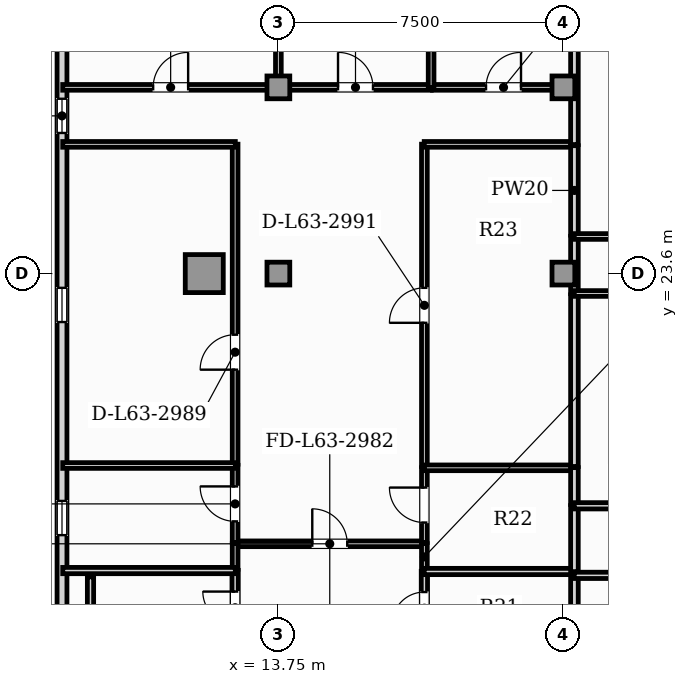
"""IFC4 building model, lengths in metres.
Left out: names, types, materials, properties, quantities, classifications, styles, units other than length and angle.
Written with IfcOpenShell. Run it as: python <this file> out.ifc"""

import sys

from ifc_helpers import new_model, si_unit, direction, frame, frame_2d, origin, origin_2d, place, context, subcontext, project, spatial, rectangle, hollow_rectangle, extrude, element, fill, save


model = new_model("IFC4")
c1 = context("Model", 3, precision=1e-05, world=origin(), true_north=direction((0.0, 1.0)))
c2 = subcontext(c1, "Body", "Model", "MODEL_VIEW")
j1 = project(units=[si_unit("LENGTHUNIT", "METRE"), si_unit("PLANEANGLEUNIT", "RADIAN")], contexts=[c1])
p1 = place(None, origin())
s1 = spatial("IfcSite", under=j1, at=p1, CompositionType="ELEMENT")
p2 = place(p1, origin())
s2 = spatial("IfcBuilding", under=s1, at=p2, CompositionType="ELEMENT")
p3 = place(p2, frame((0.0, 0.0, 256.75)))
s3 = spatial("IfcBuildingStorey", under=s2, at=p3, CompositionType="ELEMENT", Elevation=256.75)
p4 = place(p3, frame((11.8, 23.6, 0.0), z_axis=(0.0, 0.0, 1.0), x_axis=(1.0, 0.0, 0.0)))
e1 = element("IfcColumn", 1, at=p4, inside=s3, PredefinedType="USERDEFINED", context=c2, shape_type="SweptSolid", body=[
    extrude(hollow_rectangle(XDim=1.0, YDim=1.0, WallThickness=0.06, at=origin_2d()), origin(), (0.0, 0.0, 1.0), 3.85),
])
for number, where, z_axis, x_axis in (
    (2, (13.75, 23.6, 0.0), (0.0, 0.0, 1.0), (1.0, 0.0, 0.0)),
    (3, (21.25, 23.6, 0.0), (0.0, 0.0, 1.0), (1.0, 0.0, 0.0)),
    (4, (13.75, 28.5, 0.0), (0.0, 0.0, 1.0), (1.0, 0.0, 0.0)),
    (5, (21.25, 28.5, 0.0), (0.0, 0.0, 1.0), (1.0, 0.0, 0.0)),
):
    element("IfcColumn", number, at=place(p3, frame(where, z_axis=z_axis, x_axis=x_axis)), inside=s3, PredefinedType="COLUMN", context=c2, shape_type="SweptSolid", body=[
        extrude(rectangle(XDim=0.6, YDim=0.6, at=origin_2d()), origin(), (0.0, 0.0, 1.0), 3.85),
    ])
p5 = place(p3, frame((8.057, 32.726, 0.0), z_axis=(0.0, 0.0, 1.0), x_axis=(0.0, -1.0, 0.0)))
e6 = element("IfcWall", 6, at=p5, inside=s3, PredefinedType="SOLIDWALL", context=c2, shape_type="SweptSolid", body=[
    extrude(rectangle(XDim=29.486, YDim=0.26, at=frame_2d((14.743, 0.0))), origin(), (0.0, 0.0, 1.0), 3.19),
])
p6 = place(p5, frame((24.186, 0.0, 0.85)))
e7 = element("IfcOpeningElement", 7, at=p6, cuts=e6, PredefinedType="OPENING", context=c2, shape_type="SweptSolid", body=[
    extrude(rectangle(XDim=0.9, YDim=1.4, at=frame_2d((0.45, 0.7))), frame((0.0, 0.14, 0.0), z_axis=(0.0, -1.0, 0.0), x_axis=(1.0, 0.0, 0.0)), (0.0, 0.0, 1.0), 0.28),
])
p7 = place(p5, frame((4.526, 0.0, 0.85)))
e8 = element("IfcOpeningElement", 8, at=p7, cuts=e6, PredefinedType="OPENING", context=c2, shape_type="SweptSolid", body=[
    extrude(rectangle(XDim=0.9, YDim=1.4, at=frame_2d((0.45, 0.7))), frame((0.0, 0.14, 0.0), z_axis=(0.0, -1.0, 0.0), x_axis=(1.0, 0.0, 0.0)), (0.0, 0.0, 1.0), 0.28),
])
p8 = place(p5, frame((15.108, 0.0, 0.85)))
e9 = element("IfcOpeningElement", 9, at=p8, cuts=e6, PredefinedType="OPENING", context=c2, shape_type="SweptSolid", body=[
    extrude(rectangle(XDim=0.9, YDim=1.4, at=frame_2d((0.45, 0.7))), frame((0.0, 0.14, 0.0), z_axis=(0.0, -1.0, 0.0), x_axis=(1.0, 0.0, 0.0)), (0.0, 0.0, 1.0), 0.28),
])
p9 = place(p5, frame((9.501, 0.0, 0.85)))
e10 = element("IfcOpeningElement", 10, at=p9, cuts=e6, PredefinedType="OPENING", context=c2, shape_type="SweptSolid", body=[
    extrude(rectangle(XDim=0.9, YDim=1.4, at=frame_2d((0.45, 0.7))), frame((0.0, 0.14, 0.0), z_axis=(0.0, -1.0, 0.0), x_axis=(1.0, 0.0, 0.0)), (0.0, 0.0, 1.0), 0.28),
])
p10 = place(p3, frame((12.607, 16.49, 0.0), z_axis=(0.0, 0.0, 1.0), x_axis=(1.0, 0.0, 0.0)))
e11 = element("IfcWall", 11, at=p10, inside=s3, PredefinedType="PARTITIONING", context=c2, shape_type="SweptSolid", body=[
    extrude(rectangle(XDim=4.99, YDim=0.15, at=frame_2d((2.495, 0.0))), origin(), (0.0, 0.0, 1.0), 3.65),
])
p11 = place(p10, frame((2.035, 0.0, 0.0)))
e12 = element("IfcOpeningElement", 12, at=p11, cuts=e11, PredefinedType="OPENING", context=c2, shape_type="SweptSolid", body=[
    extrude(rectangle(XDim=0.92, YDim=2.1, at=frame_2d((0.46, 1.05))), frame((0.0, 0.085, 0.0), z_axis=(0.0, -1.0, 0.0), x_axis=(1.0, 0.0, 0.0)), (0.0, 0.0, 1.0), 0.17),
])
p12 = place(p3, frame((12.612, 13.825, 0.0), z_axis=(0.0, 0.0, 1.0), x_axis=(0.0, 1.0, 0.0)))
e13 = element("IfcWall", 13, at=p12, inside=s3, PredefinedType="PLUMBINGWALL", context=c2, shape_type="SweptSolid", body=[
    extrude(rectangle(XDim=1.967, YDim=0.165, at=frame_2d((0.983, 0.0))), origin(), (0.0, 0.0, 1.0), 3.65),
])
p13 = place(p12, frame((0.558, 0.0, 0.0)))
e14 = element("IfcOpeningElement", 14, at=p13, cuts=e13, PredefinedType="OPENING", context=c2, shape_type="SweptSolid", body=[
    extrude(rectangle(XDim=0.85, YDim=2.1, at=frame_2d((0.425, 1.05))), frame((0.0, 0.093, 0.0), z_axis=(0.0, -1.0, 0.0), x_axis=(1.0, 0.0, 0.0)), (0.0, 0.0, 1.0), 0.185),
])
p14 = place(p3, frame((12.612, 15.821, 0.0), z_axis=(0.0, 0.0, 1.0), x_axis=(0.0, 1.0, 0.0)))
e15 = element("IfcWall", 15, at=p14, inside=s3, PredefinedType="PARTITIONING", context=c2, shape_type="SweptSolid", body=[
    extrude(rectangle(XDim=0.674, YDim=0.15, at=frame_2d((0.337, 0.0))), origin(), (0.0, 0.0, 1.0), 3.65),
])
p15 = place(p3, frame((17.592, 13.825, 0.0), z_axis=(0.0, 0.0, 1.0), x_axis=(0.0, 1.0, 0.0)))
e16 = element("IfcWall", 16, at=p15, inside=s3, PredefinedType="PLUMBINGWALL", context=c2, shape_type="SweptSolid", body=[
    extrude(rectangle(XDim=1.942, YDim=0.165, at=frame_2d((0.971, 0.0))), origin(), (0.0, 0.0, 1.0), 3.65),
])
p16 = place(p15, frame((0.546, 0.0, 0.0)))
e17 = element("IfcOpeningElement", 17, at=p16, cuts=e16, PredefinedType="OPENING", context=c2, shape_type="SweptSolid", body=[
    extrude(rectangle(XDim=0.85, YDim=2.1, at=frame_2d((0.425, 1.05))), frame((0.0, 0.093, 0.0), z_axis=(0.0, -1.0, 0.0), x_axis=(1.0, 0.0, 0.0)), (0.0, 0.0, 1.0), 0.185),
])
p17 = place(p3, frame((17.592, 15.797, 0.0), z_axis=(0.0, 0.0, 1.0), x_axis=(0.0, 1.0, 0.0)))
e18 = element("IfcWall", 18, at=p17, inside=s3, PredefinedType="PARTITIONING", context=c2, shape_type="SweptSolid", body=[
    extrude(rectangle(XDim=0.699, YDim=0.15, at=frame_2d((0.349, 0.0))), origin(), (0.0, 0.0, 1.0), 3.65),
])
p18 = place(p3, frame((12.612, 16.525, 0.0), z_axis=(0.0, 0.0, 1.0), x_axis=(0.0, 1.0, 0.0)))
e19 = element("IfcWall", 19, at=p18, inside=s3, PredefinedType="PARTITIONING", context=c2, shape_type="SweptSolid", body=[
    extrude(rectangle(XDim=2.03, YDim=0.15, at=frame_2d((1.015, 0.0))), origin(), (0.0, 0.0, 1.0), 3.65),
])
p19 = place(p18, frame((0.555, 0.0, 0.0)))
e20 = element("IfcOpeningElement", 20, at=p19, cuts=e19, PredefinedType="OPENING", context=c2, shape_type="SweptSolid", body=[
    extrude(rectangle(XDim=0.92, YDim=2.1, at=frame_2d((0.46, 1.05))), frame((0.0, 0.085, 0.0), z_axis=(0.0, -1.0, 0.0), x_axis=(1.0, 0.0, 0.0)), (0.0, 0.0, 1.0), 0.17),
])
p20 = place(p3, frame((12.612, 18.585, 0.0), z_axis=(0.0, 0.0, 1.0), x_axis=(0.0, 1.0, 0.0)))
e21 = element("IfcWall", 21, at=p20, inside=s3, PredefinedType="PARTITIONING", context=c2, shape_type="SweptSolid", body=[
    extrude(rectangle(XDim=8.42, YDim=0.15, at=frame_2d((4.21, 0.0))), origin(), (0.0, 0.0, 1.0), 3.65),
])
p21 = place(p20, frame((2.487, 0.0, 0.0)))
e22 = element("IfcOpeningElement", 22, at=p21, cuts=e21, PredefinedType="OPENING", context=c2, shape_type="SweptSolid", body=[
    extrude(rectangle(XDim=0.92, YDim=2.1, at=frame_2d((0.46, 1.05))), frame((0.0, 0.085, 0.0), z_axis=(0.0, -1.0, 0.0), x_axis=(1.0, 0.0, 0.0)), (0.0, 0.0, 1.0), 0.17),
])
p22 = place(p3, frame((8.076, 27.0, 0.0), z_axis=(0.0, 0.0, 1.0), x_axis=(1.0, 0.0, 0.0)))
e23 = element("IfcWall", 23, at=p22, inside=s3, PredefinedType="PARTITIONING", context=c2, shape_type="SweptSolid", body=[
    extrude(rectangle(XDim=4.541, YDim=0.15, at=frame_2d((2.271, 0.0))), origin(), (0.0, 0.0, 1.0), 3.65),
])
p23 = place(p3, frame((17.592, 16.525, 0.0), z_axis=(0.0, 0.0, 1.0), x_axis=(0.0, 1.0, 0.0)))
e24 = element("IfcWall", 24, at=p23, inside=s3, PredefinedType="PARTITIONING", context=c2, shape_type="SweptSolid", body=[
    extrude(rectangle(XDim=1.969, YDim=0.15, at=frame_2d((0.984, 0.0))), origin(), (0.0, 0.0, 1.0), 3.65),
])
p24 = place(p23, frame((0.524, 0.0, 0.0)))
e25 = element("IfcOpeningElement", 25, at=p24, cuts=e24, PredefinedType="OPENING", context=c2, shape_type="SweptSolid", body=[
    extrude(rectangle(XDim=0.92, YDim=2.1, at=frame_2d((0.46, 1.05))), frame((0.0, 0.085, 0.0), z_axis=(0.0, -1.0, 0.0), x_axis=(1.0, 0.0, 0.0)), (0.0, 0.0, 1.0), 0.17),
])
p25 = place(p3, frame((17.592, 18.524, 0.0), z_axis=(0.0, 0.0, 1.0), x_axis=(0.0, 1.0, 0.0)))
e26 = element("IfcWall", 26, at=p25, inside=s3, PredefinedType="PARTITIONING", context=c2, shape_type="SweptSolid", body=[
    extrude(rectangle(XDim=8.48, YDim=0.15, at=frame_2d((4.24, 0.0))), origin(), (0.0, 0.0, 1.0), 3.65),
])
p26 = place(p25, frame((3.78, 0.0, 0.0)))
e27 = element("IfcOpeningElement", 27, at=p26, cuts=e26, PredefinedType="OPENING", context=c2, shape_type="SweptSolid", body=[
    extrude(rectangle(XDim=0.92, YDim=2.1, at=frame_2d((0.46, 1.05))), frame((0.0, 0.085, 0.0), z_axis=(0.0, -1.0, 0.0), x_axis=(1.0, 0.0, 0.0)), (0.0, 0.0, 1.0), 0.17),
])
p27 = place(p3, frame((17.587, 27.0, 0.0), z_axis=(0.0, 0.0, 1.0), x_axis=(1.0, 0.0, 0.0)))
e28 = element("IfcWall", 28, at=p27, inside=s3, PredefinedType="PARTITIONING", context=c2, shape_type="SweptSolid", body=[
    extrude(rectangle(XDim=3.958, YDim=0.15, at=frame_2d((1.979, 0.0))), origin(), (0.0, 0.0, 1.0), 3.65),
])
p28 = place(p3, frame((8.076, 28.5, 0.0), z_axis=(0.0, 0.0, 1.0), x_axis=(1.0, 0.0, 0.0)))
e29 = element("IfcWall", 29, at=p28, inside=s3, PredefinedType="PARTITIONING", context=c2, shape_type="SweptSolid", body=[
    extrude(rectangle(XDim=5.679, YDim=0.15, at=frame_2d((2.839, 0.0))), origin(), (0.0, 0.0, 1.0), 3.65),
])
p29 = place(p28, frame((2.379, 0.0, 0.0)))
e30 = element("IfcOpeningElement", 30, at=p29, cuts=e29, PredefinedType="OPENING", context=c2, shape_type="SweptSolid", body=[
    extrude(rectangle(XDim=0.92, YDim=2.1, at=frame_2d((0.46, 1.05))), frame((0.0, 0.085, 0.0), z_axis=(0.0, -1.0, 0.0), x_axis=(1.0, 0.0, 0.0)), (0.0, 0.0, 1.0), 0.17),
])
p30 = place(p3, frame((13.785, 28.5, 0.0), z_axis=(0.0, 0.0, 1.0), x_axis=(1.0, 0.0, 0.0)))
e31 = element("IfcWall", 31, at=p30, inside=s3, PredefinedType="PARTITIONING", context=c2, shape_type="SweptSolid", body=[
    extrude(rectangle(XDim=3.989, YDim=0.15, at=frame_2d((1.994, 0.0))), origin(), (0.0, 0.0, 1.0), 3.105),
])
p31 = place(p30, frame((1.534, 0.0, 0.0)))
e32 = element("IfcOpeningElement", 32, at=p31, cuts=e31, PredefinedType="OPENING", context=c2, shape_type="SweptSolid", body=[
    extrude(rectangle(XDim=0.92, YDim=2.1, at=frame_2d((0.46, 1.05))), frame((0.0, 0.085, 0.0), z_axis=(0.0, -1.0, 0.0), x_axis=(1.0, 0.0, 0.0)), (0.0, 0.0, 1.0), 0.17),
])
p32 = place(p3, frame((17.804, 28.5, 0.0), z_axis=(0.0, 0.0, 1.0), x_axis=(1.0, 0.0, 0.0)))
e33 = element("IfcWall", 33, at=p32, inside=s3, PredefinedType="PARTITIONING", context=c2, shape_type="SweptSolid", body=[
    extrude(rectangle(XDim=3.741, YDim=0.15, at=frame_2d((1.871, 0.0))), origin(), (0.0, 0.0, 1.0), 3.105),
])
p33 = place(p32, frame((1.411, 0.0, 0.0)))
e34 = element("IfcOpeningElement", 34, at=p33, cuts=e33, PredefinedType="OPENING", context=c2, shape_type="SweptSolid", body=[
    extrude(rectangle(XDim=0.92, YDim=2.1, at=frame_2d((0.46, 1.05))), frame((0.0, 0.085, 0.0), z_axis=(0.0, -1.0, 0.0), x_axis=(1.0, 0.0, 0.0)), (0.0, 0.0, 1.0), 0.17),
])
p34 = place(p3, frame((21.54, 26.995, 0.0), z_axis=(0.0, 0.0, 1.0), x_axis=(0.0, 1.0, 0.0)))
e35 = element("IfcWall", 35, at=p34, inside=s3, PredefinedType="PARTITIONING", context=c2, shape_type="SweptSolid", body=[
    extrude(rectangle(XDim=2.622, YDim=0.2, at=frame_2d((1.311, 0.0))), origin(), (0.0, 0.0, 1.0), 3.65),
])
p35 = place(p3, frame((8.076, 15.786, 0.0), z_axis=(0.0, 0.0, 1.0), x_axis=(1.0, 0.0, 0.0)))
e36 = element("IfcWall", 36, at=p35, inside=s3, PredefinedType="PLUMBINGWALL", context=c2, shape_type="SweptSolid", body=[
    extrude(rectangle(XDim=4.541, YDim=0.165, at=frame_2d((2.271, 0.0))), origin(), (0.0, 0.0, 1.0), 3.65),
])
p36 = place(p3, frame((8.076, 18.55, 0.0), z_axis=(0.0, 0.0, 1.0), x_axis=(1.0, 0.0, 0.0)))
e37 = element("IfcWall", 37, at=p36, inside=s3, PredefinedType="PARTITIONING", context=c2, shape_type="SweptSolid", body=[
    extrude(rectangle(XDim=4.541, YDim=0.15, at=frame_2d((2.271, 0.0))), origin(), (0.0, 0.0, 1.0), 3.65),
])
p37 = place(p3, frame((17.587, 15.762, 0.0), z_axis=(0.0, 0.0, 1.0), x_axis=(1.0, 0.0, 0.0)))
e38 = element("IfcWall", 38, at=p37, inside=s3, PredefinedType="PLUMBINGWALL", context=c2, shape_type="SweptSolid", body=[
    extrude(rectangle(XDim=3.958, YDim=0.165, at=frame_2d((1.979, 0.0))), origin(), (0.0, 0.0, 1.0), 3.65),
])
p38 = place(p3, frame((21.54, 13.825, 0.0), z_axis=(0.0, 0.0, 1.0), x_axis=(0.0, 1.0, 0.0)))
e39 = element("IfcWall", 39, at=p38, inside=s3, PredefinedType="PARTITIONING", context=c2, shape_type="SweptSolid", body=[
    extrude(rectangle(XDim=1.84, YDim=0.2, at=frame_2d((0.92, 0.0))), origin(), (0.0, 0.0, 1.0), 3.65),
])
p39 = place(p3, frame((17.587, 18.49, 0.0), z_axis=(0.0, 0.0, 1.0), x_axis=(1.0, 0.0, 0.0)))
e40 = element("IfcWall", 40, at=p39, inside=s3, PredefinedType="PARTITIONING", context=c2, shape_type="SweptSolid", body=[
    extrude(rectangle(XDim=3.958, YDim=0.15, at=frame_2d((1.979, 0.0))), origin(), (0.0, 0.0, 1.0), 3.65),
])
p40 = place(p3, frame((21.54, 15.757, 0.0), z_axis=(0.0, 0.0, 1.0), x_axis=(0.0, 1.0, 0.0)))
e41 = element("IfcWall", 41, at=p40, inside=s3, PredefinedType="PARTITIONING", context=c2, shape_type="SweptSolid", body=[
    extrude(rectangle(XDim=1.739, YDim=0.2, at=frame_2d((0.869, 0.0))), origin(), (0.0, 0.0, 1.0), 3.65),
])
p41 = place(p3, frame((21.54, 17.525, 0.0), z_axis=(0.0, 0.0, 1.0), x_axis=(0.0, 1.0, 0.0)))
e42 = element("IfcWall", 42, at=p41, inside=s3, PredefinedType="PARTITIONING", context=c2, shape_type="SweptSolid", body=[
    extrude(rectangle(XDim=0.969, YDim=0.2, at=frame_2d((0.485, 0.0))), origin(), (0.0, 0.0, 1.0), 3.65),
])
p42 = place(p3, frame((21.54, 23.071, 0.0), z_axis=(0.0, 0.0, 1.0), x_axis=(0.0, 1.0, 0.0)))
e43 = element("IfcWall", 43, at=p42, inside=s3, PredefinedType="PARTITIONING", context=c2, shape_type="SweptSolid", body=[
    extrude(rectangle(XDim=1.51, YDim=0.2, at=frame_2d((0.755, 0.0))), origin(), (0.0, 0.0, 1.0), 3.65),
])
p43 = place(p3, frame((21.54, 18.524, 0.0), z_axis=(0.0, 0.0, 1.0), x_axis=(0.0, 1.0, 0.0)))
e44 = element("IfcWall", 44, at=p43, inside=s3, PredefinedType="PARTITIONING", context=c2, shape_type="SweptSolid", body=[
    extrude(rectangle(XDim=4.517, YDim=0.2, at=frame_2d((2.258, 0.0))), origin(), (0.0, 0.0, 1.0), 3.65),
])
p44 = place(p3, frame((21.54, 24.611, 0.0), z_axis=(0.0, 0.0, 1.0), x_axis=(0.0, 1.0, 0.0)))
e45 = element("IfcWall", 45, at=p44, inside=s3, PredefinedType="PARTITIONING", context=c2, shape_type="SweptSolid", body=[
    extrude(rectangle(XDim=2.354, YDim=0.2, at=frame_2d((1.177, 0.0))), origin(), (0.0, 0.0, 1.0), 3.65),
])
p45 = place(p3, frame((13.75, 28.495, 0.0), z_axis=(0.0, 0.0, 1.0), x_axis=(0.0, 1.0, 0.0)))
e46 = element("IfcWall", 46, at=p45, inside=s3, PredefinedType="PARTITIONING", context=c2, shape_type="SweptSolid", body=[
    extrude(rectangle(XDim=7.322, YDim=0.15, at=frame_2d((3.661, 0.0))), origin(), (0.0, 0.0, 1.0), 3.65),
])
p46 = place(p3, frame((17.769, 28.495, 0.0), z_axis=(0.0, 0.0, 1.0), x_axis=(0.0, 1.0, 0.0)))
e47 = element("IfcWall", 47, at=p46, inside=s3, PredefinedType="PARTITIONING", context=c2, shape_type="SweptSolid", body=[
    extrude(rectangle(XDim=7.048, YDim=0.15, at=frame_2d((3.524, 0.0))), origin(), (0.0, 0.0, 1.0), 3.65),
])
p47 = place(p3, frame((21.535, 23.076, 0.0), z_axis=(0.0, 0.0, 1.0), x_axis=(1.0, 0.0, 0.0)))
e48 = element("IfcWall", 48, at=p47, inside=s3, PredefinedType="PARTITIONING", context=c2, shape_type="SweptSolid", body=[
    extrude(rectangle(XDim=4.73, YDim=0.15, at=frame_2d((2.365, 0.0))), origin(), (0.0, 0.0, 1.0), 3.65),
])
p48 = place(p3, frame((21.535, 24.576, 0.0), z_axis=(0.0, 0.0, 1.0), x_axis=(1.0, 0.0, 0.0)))
e49 = element("IfcWall", 49, at=p48, inside=s3, PredefinedType="PARTITIONING", context=c2, shape_type="SweptSolid", body=[
    extrude(rectangle(XDim=7.22, YDim=0.15, at=frame_2d((3.61, 0.0))), origin(), (0.0, 0.0, 1.0), 3.65),
])
p49 = place(p48, frame((3.15, 0.0, 0.0)))
e50 = element("IfcOpeningElement", 50, at=p49, cuts=e49, PredefinedType="OPENING", context=c2, shape_type="SweptSolid", body=[
    extrude(rectangle(XDim=0.92, YDim=2.1, at=frame_2d((0.46, 1.05))), frame((0.0, 0.085, 0.0), z_axis=(0.0, -1.0, 0.0), x_axis=(1.0, 0.0, 0.0)), (0.0, 0.0, 1.0), 0.17),
])
for number, where, z_axis, x_axis in (
    (51, (21.535, 15.66, 0.0), (0.0, 0.0, 1.0), (1.0, 0.0, 0.0)),
    (52, (21.535, 17.49, 0.0), (0.0, 0.0, 1.0), (1.0, 0.0, 0.0)),
):
    element("IfcWall", number, at=place(p3, frame(where, z_axis=z_axis, x_axis=x_axis)), inside=s3, PredefinedType="PLUMBINGWALL", context=c2, shape_type="SweptSolid", body=[
        extrude(rectangle(XDim=4.73, YDim=0.165, at=frame_2d((2.365, 0.0))), origin(), (0.0, 0.0, 1.0), 3.65),
    ])
p50 = place(p3, frame((8.807, 13.995, 0.0), z_axis=(0.0, 0.0, 1.0), x_axis=(0.0, 1.0, 0.0)))
e53 = element("IfcWall", 53, at=p50, inside=s3, PredefinedType="PLUMBINGWALL", context=c2, shape_type="SweptSolid", body=[
    extrude(rectangle(XDim=1.626, YDim=0.165, at=frame_2d((0.813, 0.0))), origin(), (0.0, 0.0, 1.0), 3.65),
])
p51 = place(p7, origin())
e54 = element("IfcWindow", 54, at=p51, inside=s3, PartitioningType="SINGLE_PANEL", PredefinedType="WINDOW", context=c2, shape_type="SweptSolid", body=[
    extrude(rectangle(XDim=0.9, YDim=1.4, at=frame_2d((0.45, 0.7))), frame((0.0, 0.03, 0.0), z_axis=(0.0, -1.0, 0.0), x_axis=(1.0, 0.0, 0.0)), (0.0, 0.0, 1.0), 0.06),
])
fill(e8, e54)
p52 = place(p8, origin())
e55 = element("IfcWindow", 55, at=p52, inside=s3, PartitioningType="SINGLE_PANEL", PredefinedType="WINDOW", context=c2, shape_type="SweptSolid", body=[
    extrude(rectangle(XDim=0.9, YDim=1.4, at=frame_2d((0.45, 0.7))), frame((0.0, 0.03, 0.0), z_axis=(0.0, -1.0, 0.0), x_axis=(1.0, 0.0, 0.0)), (0.0, 0.0, 1.0), 0.06),
])
fill(e9, e55)
p53 = place(p9, origin())
e56 = element("IfcWindow", 56, at=p53, inside=s3, PartitioningType="SINGLE_PANEL", PredefinedType="WINDOW", context=c2, shape_type="SweptSolid", body=[
    extrude(rectangle(XDim=0.9, YDim=1.4, at=frame_2d((0.45, 0.7))), frame((0.0, 0.03, 0.0), z_axis=(0.0, -1.0, 0.0), x_axis=(1.0, 0.0, 0.0)), (0.0, 0.0, 1.0), 0.06),
])
fill(e10, e56)
p54 = place(p11, origin())
e57 = element("IfcDoor", 57, at=p54, inside=s3, OperationType="SINGLE_SWING_LEFT", PredefinedType="DOOR", context=c2, shape_type="SweptSolid", body=[
    extrude(rectangle(XDim=0.92, YDim=2.1, at=frame_2d((0.46, 1.05))), frame((0.0, 0.025, 0.0), z_axis=(0.0, -1.0, 0.0), x_axis=(1.0, 0.0, 0.0)), (0.0, 0.0, 1.0), 0.05),
])
fill(e12, e57)
p55 = place(p13, origin())
e58 = element("IfcDoor", 58, at=p55, inside=s3, OperationType="SINGLE_SWING_RIGHT", PredefinedType="DOOR", context=c2, shape_type="SweptSolid", body=[
    extrude(rectangle(XDim=0.85, YDim=2.1, at=frame_2d((0.425, 1.05))), frame((0.0, 0.025, 0.0), z_axis=(0.0, -1.0, 0.0), x_axis=(1.0, 0.0, 0.0)), (0.0, 0.0, 1.0), 0.05),
])
fill(e14, e58)
p56 = place(p16, origin())
e59 = element("IfcDoor", 59, at=p56, inside=s3, OperationType="SINGLE_SWING_LEFT", PredefinedType="DOOR", context=c2, shape_type="SweptSolid", body=[
    extrude(rectangle(XDim=0.85, YDim=2.1, at=frame_2d((0.425, 1.05))), frame((0.0, 0.025, 0.0), z_axis=(0.0, -1.0, 0.0), x_axis=(1.0, 0.0, 0.0)), (0.0, 0.0, 1.0), 0.05),
])
fill(e17, e59)
p57 = place(p19, origin())
e60 = element("IfcDoor", 60, at=p57, inside=s3, OperationType="SINGLE_SWING_RIGHT", PredefinedType="DOOR", context=c2, shape_type="SweptSolid", body=[
    extrude(rectangle(XDim=0.92, YDim=2.1, at=frame_2d((0.46, 1.05))), frame((0.0, 0.025, 0.0), z_axis=(0.0, -1.0, 0.0), x_axis=(1.0, 0.0, 0.0)), (0.0, 0.0, 1.0), 0.05),
])
fill(e20, e60)
p58 = place(p21, origin())
e61 = element("IfcDoor", 61, at=p58, inside=s3, OperationType="SINGLE_SWING_LEFT", PredefinedType="DOOR", context=c2, shape_type="SweptSolid", body=[
    extrude(rectangle(XDim=0.92, YDim=2.1, at=frame_2d((0.46, 1.05))), frame((0.0, 0.025, 0.0), z_axis=(0.0, -1.0, 0.0), x_axis=(1.0, 0.0, 0.0)), (0.0, 0.0, 1.0), 0.05),
])
fill(e22, e61)
p59 = place(p24, origin())
e62 = element("IfcDoor", 62, at=p59, inside=s3, OperationType="SINGLE_SWING_RIGHT", PredefinedType="DOOR", context=c2, shape_type="SweptSolid", body=[
    extrude(rectangle(XDim=0.92, YDim=2.1, at=frame_2d((0.46, 1.05))), frame((0.0, 0.025, 0.0), z_axis=(0.0, -1.0, 0.0), x_axis=(1.0, 0.0, 0.0)), (0.0, 0.0, 1.0), 0.05),
])
fill(e25, e62)
p60 = place(p26, origin())
e63 = element("IfcDoor", 63, at=p60, inside=s3, OperationType="SINGLE_SWING_LEFT", PredefinedType="DOOR", context=c2, shape_type="SweptSolid", body=[
    extrude(rectangle(XDim=0.92, YDim=2.1, at=frame_2d((0.46, 1.05))), frame((0.0, 0.025, 0.0), z_axis=(0.0, -1.0, 0.0), x_axis=(1.0, 0.0, 0.0)), (0.0, 0.0, 1.0), 0.05),
])
fill(e27, e63)
p61 = place(p29, origin())
e64 = element("IfcDoor", 64, at=p61, inside=s3, OperationType="SINGLE_SWING_RIGHT", PredefinedType="DOOR", context=c2, shape_type="SweptSolid", body=[
    extrude(rectangle(XDim=0.92, YDim=2.1, at=frame_2d((0.46, 1.05))), frame((0.0, 0.025, 0.0), z_axis=(0.0, -1.0, 0.0), x_axis=(1.0, 0.0, 0.0)), (0.0, 0.0, 1.0), 0.05),
])
fill(e30, e64)
p62 = place(p31, origin())
e65 = element("IfcDoor", 65, at=p62, inside=s3, OperationType="SINGLE_SWING_LEFT", PredefinedType="DOOR", context=c2, shape_type="SweptSolid", body=[
    extrude(rectangle(XDim=0.92, YDim=2.1, at=frame_2d((0.46, 1.05))), frame((0.0, 0.025, 0.0), z_axis=(0.0, -1.0, 0.0), x_axis=(1.0, 0.0, 0.0)), (0.0, 0.0, 1.0), 0.05),
])
fill(e32, e65)
p63 = place(p33, origin())
e66 = element("IfcDoor", 66, at=p63, inside=s3, OperationType="SINGLE_SWING_RIGHT", PredefinedType="DOOR", context=c2, shape_type="SweptSolid", body=[
    extrude(rectangle(XDim=0.92, YDim=2.1, at=frame_2d((0.46, 1.05))), frame((0.0, 0.025, 0.0), z_axis=(0.0, -1.0, 0.0), x_axis=(1.0, 0.0, 0.0)), (0.0, 0.0, 1.0), 0.05),
])
fill(e34, e66)
save(model, sys.argv[1])
